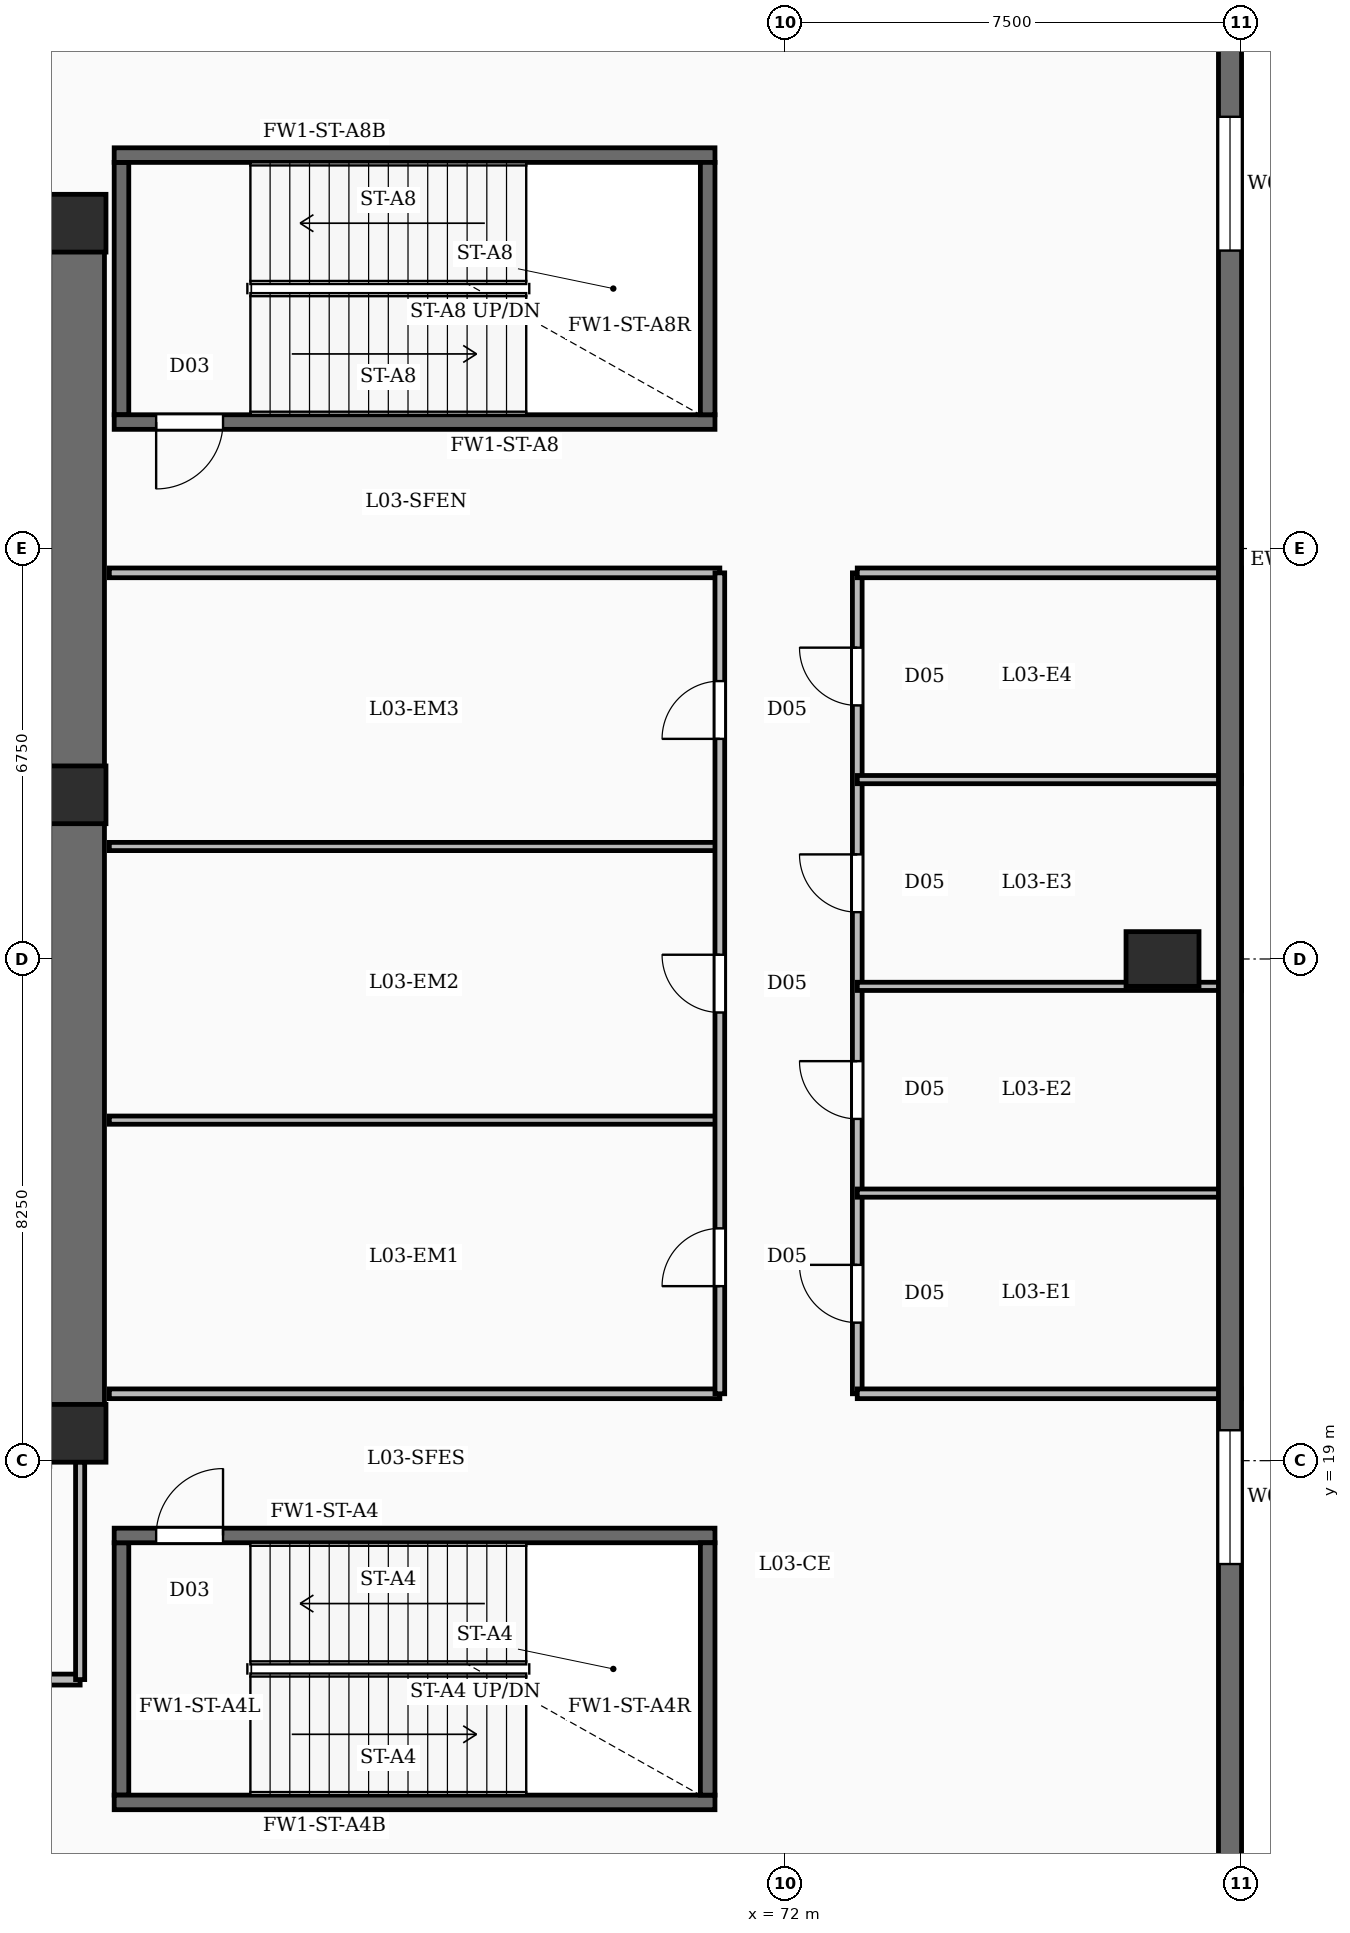
"""IFC4 building model, lengths in metres.
Left out: names, types, materials, properties, quantities, classifications, styles, units other than length and angle.
Written with IfcOpenShell. Run it as: python <this file> out.ifc"""

import sys

from ifc_helpers import new_model, si_unit, direction, frame, frame_2d, origin, origin_2d, place, context, subcontext, project, spatial, rectangle, extrude, element, fill, save


model = new_model("IFC4")
c1 = context("Model", 3, precision=1e-05, world=origin(), true_north=direction((0.0, 1.0)))
c2 = subcontext(c1, "Body", "Model", "MODEL_VIEW")
j1 = project(units=[si_unit("LENGTHUNIT", "METRE"), si_unit("PLANEANGLEUNIT", "RADIAN")], contexts=[c1])
p1 = place(None, origin())
s1 = spatial("IfcSite", under=j1, at=p1, CompositionType="ELEMENT")
p2 = place(p1, origin())
s2 = spatial("IfcBuilding", under=s1, at=p2, CompositionType="ELEMENT")
p3 = place(p2, frame((0.0, 0.0, 18.0)))
s3 = spatial("IfcBuildingStorey", under=s2, at=p3, CompositionType="ELEMENT", Elevation=18.0)
p4 = place(p3, frame((60.35, 19.0, -0.35), z_axis=(0.0, 0.0, 1.0), x_axis=(0.0, 1.0, 0.0)))
e1 = element("IfcWall", 1, at=p4, inside=s3, PredefinedType="SHEAR", context=c2, shape_type="SweptSolid", body=[
    extrude(rectangle(XDim=20.8, YDim=0.9, at=frame_2d((10.4, 0.0))), origin(), (0.0, 0.0, 1.0), 5.0),
])
for number, where, z_axis, x_axis in (
    (2, (60.35, 19.45, -0.35), (0.0, 0.0, 1.0), (1.0, 0.0, 0.0)),
    (3, (60.35, 29.95, -0.35), (0.0, 0.0, 1.0), (1.0, 0.0, 0.0)),
    (4, (60.35, 39.35, -0.35), (0.0, 0.0, 1.0), (1.0, 0.0, 0.0)),
):
    element("IfcColumn", number, at=place(p3, frame(where, z_axis=z_axis, x_axis=x_axis)), inside=s3, PredefinedType="COLUMN", context=c2, shape_type="SweptSolid", body=[
        extrude(rectangle(XDim=0.95, YDim=0.95, at=origin_2d()), origin(), (0.0, 0.0, 1.0), 5.0),
    ])
p5 = place(p3, frame((78.2, 27.25, -0.35), z_axis=(0.0, 0.0, 1.0), x_axis=(1.0, 0.0, 0.0)))
e5 = element("IfcColumn", 5, at=p5, inside=s3, PredefinedType="COLUMN", context=c2, shape_type="SweptSolid", body=[
    extrude(rectangle(XDim=1.2, YDim=0.9, at=origin_2d()), origin(), (0.0, 0.0, 1.0), 5.0),
])
p6 = place(p3, frame((79.31, 49.1, 0.0), z_axis=(0.0, 0.0, 1.0), x_axis=(0.0, -1.0, 0.0)))
e6 = element("IfcWall", 6, at=p6, inside=s3, PredefinedType="SOLIDWALL", context=c2, shape_type="SweptSolid", body=[
    extrude(rectangle(XDim=43.7, YDim=0.38, at=frame_2d((21.85, 0.0))), origin(), (0.0, 0.0, 1.0), 4.65),
])
p7 = place(p6, frame((2.6, 0.0, 0.95)))
e7 = element("IfcOpeningElement", 7, at=p7, cuts=e6, PredefinedType="OPENING", context=c2, shape_type="SweptSolid", body=[
    extrude(rectangle(XDim=2.2, YDim=2.5, at=frame_2d((1.1, 1.25))), frame((0.0, 0.2, 0.0), z_axis=(0.0, -1.0, 0.0), x_axis=(1.0, 0.0, 0.0)), (0.0, 0.0, 1.0), 0.4),
])
p8 = place(p6, frame((8.0, 0.0, 0.95)))
e8 = element("IfcOpeningElement", 8, at=p8, cuts=e6, PredefinedType="OPENING", context=c2, shape_type="SweptSolid", body=[
    extrude(rectangle(XDim=2.2, YDim=2.5, at=frame_2d((1.1, 1.25))), frame((0.0, 0.2, 0.0), z_axis=(0.0, -1.0, 0.0), x_axis=(1.0, 0.0, 0.0)), (0.0, 0.0, 1.0), 0.4),
])
p9 = place(p6, frame((29.6, 0.0, 0.95)))
e9 = element("IfcOpeningElement", 9, at=p9, cuts=e6, PredefinedType="OPENING", context=c2, shape_type="SweptSolid", body=[
    extrude(rectangle(XDim=2.2, YDim=2.5, at=frame_2d((1.1, 1.25))), frame((0.0, 0.2, 0.0), z_axis=(0.0, -1.0, 0.0), x_axis=(1.0, 0.0, 0.0)), (0.0, 0.0, 1.0), 0.4),
])
p10 = place(p3, frame((60.96, 17.77, 0.0), z_axis=(0.0, 0.0, 1.0), x_axis=(1.0, 0.0, 0.0)))
e10 = element("IfcWall", 10, at=p10, inside=s3, PredefinedType="SOLIDWALL", context=c2, shape_type="SweptSolid", body=[
    extrude(rectangle(XDim=9.88, YDim=0.24, at=frame_2d((4.94, 0.0))), origin(), (0.0, 0.0, 1.0), 4.65),
])
p11 = place(p10, frame((0.69, 0.0, 0.0)))
e11 = element("IfcOpeningElement", 11, at=p11, cuts=e10, PredefinedType="OPENING", context=c2, shape_type="SweptSolid", body=[
    extrude(rectangle(XDim=1.1, YDim=2.15, at=frame_2d((0.55, 1.075))), frame((0.0, 0.13, 0.0), z_axis=(0.0, -1.0, 0.0), x_axis=(1.0, 0.0, 0.0)), (0.0, 0.0, 1.0), 0.26),
])
p12 = place(p3, frame((60.96, 13.38, 0.0), z_axis=(0.0, 0.0, 1.0), x_axis=(1.0, 0.0, 0.0)))
e12 = element("IfcWall", 12, at=p12, inside=s3, PredefinedType="SOLIDWALL", context=c2, shape_type="SweptSolid", body=[
    extrude(rectangle(XDim=9.88, YDim=0.24, at=frame_2d((4.94, 0.0))), origin(), (0.0, 0.0, 1.0), 4.65),
])
for number, where, z_axis, x_axis in (
    (13, (61.08, 13.5, 0.0), (0.0, 0.0, 1.0), (0.0, 1.0, 0.0)),
    (14, (70.72, 13.5, 0.0), (0.0, 0.0, 1.0), (0.0, 1.0, 0.0)),
):
    element("IfcWall", number, at=place(p3, frame(where, z_axis=z_axis, x_axis=x_axis)), inside=s3, PredefinedType="SOLIDWALL", context=c2, shape_type="SweptSolid", body=[
        extrude(rectangle(XDim=4.15, YDim=0.24, at=frame_2d((2.075, 0.0))), origin(), (0.0, 0.0, 1.0), 4.65),
    ])
p13 = place(p3, frame((70.84, 36.08, 0.0), z_axis=(0.0, 0.0, 1.0), x_axis=(-1.0, 0.0, 0.0)))
e15 = element("IfcWall", 15, at=p13, inside=s3, PredefinedType="SOLIDWALL", context=c2, shape_type="SweptSolid", body=[
    extrude(rectangle(XDim=9.88, YDim=0.24, at=frame_2d((4.94, 0.0))), origin(), (0.0, 0.0, 1.0), 4.65),
])
p14 = place(p13, frame((8.09, 0.0, 0.0)))
e16 = element("IfcOpeningElement", 16, at=p14, cuts=e15, PredefinedType="OPENING", context=c2, shape_type="SweptSolid", body=[
    extrude(rectangle(XDim=1.1, YDim=2.15, at=frame_2d((0.55, 1.075))), frame((0.0, 0.13, 0.0), z_axis=(0.0, -1.0, 0.0), x_axis=(1.0, 0.0, 0.0)), (0.0, 0.0, 1.0), 0.26),
])
p15 = place(p3, frame((60.96, 40.47, 0.0), z_axis=(0.0, 0.0, 1.0), x_axis=(1.0, 0.0, 0.0)))
e17 = element("IfcWall", 17, at=p15, inside=s3, PredefinedType="SOLIDWALL", context=c2, shape_type="SweptSolid", body=[
    extrude(rectangle(XDim=9.88, YDim=0.24, at=frame_2d((4.94, 0.0))), origin(), (0.0, 0.0, 1.0), 4.65),
])
for number, where, z_axis, x_axis in (
    (18, (61.08, 36.2, 0.0), (0.0, 0.0, 1.0), (0.0, 1.0, 0.0)),
    (19, (70.72, 36.2, 0.0), (0.0, 0.0, 1.0), (0.0, 1.0, 0.0)),
):
    element("IfcWall", number, at=place(p3, frame(where, z_axis=z_axis, x_axis=x_axis)), inside=s3, PredefinedType="SOLIDWALL", context=c2, shape_type="SweptSolid", body=[
        extrude(rectangle(XDim=4.15, YDim=0.24, at=frame_2d((2.075, 0.0))), origin(), (0.0, 0.0, 1.0), 4.65),
    ])
p16 = place(p3, frame((50.4, 15.4, 0.0), z_axis=(0.0, 0.0, 1.0), x_axis=(1.0, 0.0, 0.0)))
e20 = element("IfcWall", 20, at=p16, inside=s3, PredefinedType="SOLIDWALL", context=c2, shape_type="SweptSolid", body=[
    extrude(rectangle(XDim=10.0, YDim=0.18, at=frame_2d((5.0, 0.0))), origin(), (0.0, 0.0, 1.0), 3.71),
])
p17 = place(p16, frame((0.54, 0.0, 0.0)))
e21 = element("IfcOpeningElement", 21, at=p17, cuts=e20, PredefinedType="OPENING", context=c2, shape_type="SweptSolid", body=[
    extrude(rectangle(XDim=0.92, YDim=2.1, at=frame_2d((0.46, 1.05))), frame((0.0, 0.1, 0.0), z_axis=(0.0, -1.0, 0.0), x_axis=(1.0, 0.0, 0.0)), (0.0, 0.0, 1.0), 0.2),
])
p18 = place(p16, frame((2.54, 0.0, 0.0)))
e22 = element("IfcOpeningElement", 22, at=p18, cuts=e20, PredefinedType="OPENING", context=c2, shape_type="SweptSolid", body=[
    extrude(rectangle(XDim=0.92, YDim=2.1, at=frame_2d((0.46, 1.05))), frame((0.0, 0.1, 0.0), z_axis=(0.0, -1.0, 0.0), x_axis=(1.0, 0.0, 0.0)), (0.0, 0.0, 1.0), 0.2),
])
p19 = place(p16, frame((4.54, 0.0, 0.0)))
e23 = element("IfcOpeningElement", 23, at=p19, cuts=e20, PredefinedType="OPENING", context=c2, shape_type="SweptSolid", body=[
    extrude(rectangle(XDim=0.92, YDim=2.1, at=frame_2d((0.46, 1.05))), frame((0.0, 0.1, 0.0), z_axis=(0.0, -1.0, 0.0), x_axis=(1.0, 0.0, 0.0)), (0.0, 0.0, 1.0), 0.2),
])
p20 = place(p16, frame((6.54, 0.0, 0.0)))
e24 = element("IfcOpeningElement", 24, at=p20, cuts=e20, PredefinedType="OPENING", context=c2, shape_type="SweptSolid", body=[
    extrude(rectangle(XDim=0.92, YDim=2.1, at=frame_2d((0.46, 1.05))), frame((0.0, 0.1, 0.0), z_axis=(0.0, -1.0, 0.0), x_axis=(1.0, 0.0, 0.0)), (0.0, 0.0, 1.0), 0.2),
])
p21 = place(p16, frame((8.57, 0.0, 0.0)))
e25 = element("IfcOpeningElement", 25, at=p21, cuts=e20, PredefinedType="OPENING", context=c2, shape_type="SweptSolid", body=[
    extrude(rectangle(XDim=0.86, YDim=2.05, at=frame_2d((0.43, 1.025))), frame((0.0, 0.1, 0.0), z_axis=(0.0, -1.0, 0.0), x_axis=(1.0, 0.0, 0.0)), (0.0, 0.0, 1.0), 0.2),
])
p22 = place(p3, frame((60.4, 15.4, 0.0), z_axis=(0.0, 0.0, 1.0), x_axis=(0.0, 1.0, 0.0)))
e26 = element("IfcWall", 26, at=p22, inside=s3, PredefinedType="PARTITIONING", context=c2, shape_type="SweptSolid", body=[
    extrude(rectangle(XDim=3.58, YDim=0.15, at=frame_2d((1.79, 0.0))), origin(), (0.0, 0.0, 1.0), 3.71),
])
for number, where, z_axis, x_axis in (
    (27, (73.18, 23.4, 0.0), (0.0, 0.0, 1.0), (1.0, 0.0, 0.0)),
    (28, (73.18, 26.8, 0.0), (0.0, 0.0, 1.0), (1.0, 0.0, 0.0)),
    (29, (73.18, 30.2, 0.0), (0.0, 0.0, 1.0), (1.0, 0.0, 0.0)),
):
    element("IfcWall", number, at=place(p3, frame(where, z_axis=z_axis, x_axis=x_axis)), inside=s3, PredefinedType="PARTITIONING", context=c2, shape_type="SweptSolid", body=[
        extrude(rectangle(XDim=6.32, YDim=0.135, at=frame_2d((3.16, 0.0))), origin(), (0.0, 0.0, 1.0), 3.71),
    ])
for number, where, z_axis, x_axis in (
    (30, (60.88, 24.6, 0.0), (0.0, 0.0, 1.0), (1.0, 0.0, 0.0)),
    (31, (60.88, 29.1, 0.0), (0.0, 0.0, 1.0), (1.0, 0.0, 0.0)),
):
    element("IfcWall", number, at=place(p3, frame(where, z_axis=z_axis, x_axis=x_axis)), inside=s3, PredefinedType="PARTITIONING", context=c2, shape_type="SweptSolid", body=[
        extrude(rectangle(XDim=10.04, YDim=0.135, at=frame_2d((5.02, 0.0))), origin(), (0.0, 0.0, 1.0), 3.71),
    ])
p23 = place(p3, frame((70.92, 20.1, 0.0), z_axis=(0.0, 0.0, 1.0), x_axis=(0.0, 1.0, 0.0)))
e32 = element("IfcWall", 32, at=p23, inside=s3, PredefinedType="PARTITIONING", context=c2, shape_type="SweptSolid", body=[
    extrude(rectangle(XDim=13.5, YDim=0.16, at=frame_2d((6.75, 0.0))), origin(), (0.0, 0.0, 1.0), 3.71),
])
p24 = place(p23, frame((1.77, 0.0, 0.0)))
e33 = element("IfcOpeningElement", 33, at=p24, cuts=e32, PredefinedType="OPENING", context=c2, shape_type="SweptSolid", body=[
    extrude(rectangle(XDim=0.95, YDim=2.15, at=frame_2d((0.475, 1.075))), frame((0.0, 0.09, 0.0), z_axis=(0.0, -1.0, 0.0), x_axis=(1.0, 0.0, 0.0)), (0.0, 0.0, 1.0), 0.18),
])
p25 = place(p23, frame((6.27, 0.0, 0.0)))
e34 = element("IfcOpeningElement", 34, at=p25, cuts=e32, PredefinedType="OPENING", context=c2, shape_type="SweptSolid", body=[
    extrude(rectangle(XDim=0.95, YDim=2.15, at=frame_2d((0.475, 1.075))), frame((0.0, 0.09, 0.0), z_axis=(0.0, -1.0, 0.0), x_axis=(1.0, 0.0, 0.0)), (0.0, 0.0, 1.0), 0.18),
])
p26 = place(p23, frame((10.77, 0.0, 0.0)))
e35 = element("IfcOpeningElement", 35, at=p26, cuts=e32, PredefinedType="OPENING", context=c2, shape_type="SweptSolid", body=[
    extrude(rectangle(XDim=0.95, YDim=2.15, at=frame_2d((0.475, 1.075))), frame((0.0, 0.09, 0.0), z_axis=(0.0, -1.0, 0.0), x_axis=(1.0, 0.0, 0.0)), (0.0, 0.0, 1.0), 0.18),
])
p27 = place(p3, frame((73.18, 20.1, 0.0), z_axis=(0.0, 0.0, 1.0), x_axis=(0.0, 1.0, 0.0)))
e36 = element("IfcWall", 36, at=p27, inside=s3, PredefinedType="PARTITIONING", context=c2, shape_type="SweptSolid", body=[
    extrude(rectangle(XDim=13.5, YDim=0.16, at=frame_2d((6.75, 0.0))), origin(), (0.0, 0.0, 1.0), 3.71),
])
p28 = place(p27, frame((1.17, 0.0, 0.0)))
e37 = element("IfcOpeningElement", 37, at=p28, cuts=e36, PredefinedType="OPENING", context=c2, shape_type="SweptSolid", body=[
    extrude(rectangle(XDim=0.95, YDim=2.15, at=frame_2d((0.475, 1.075))), frame((0.0, 0.09, 0.0), z_axis=(0.0, -1.0, 0.0), x_axis=(1.0, 0.0, 0.0)), (0.0, 0.0, 1.0), 0.18),
])
p29 = place(p27, frame((4.52, 0.0, 0.0)))
e38 = element("IfcOpeningElement", 38, at=p29, cuts=e36, PredefinedType="OPENING", context=c2, shape_type="SweptSolid", body=[
    extrude(rectangle(XDim=0.95, YDim=2.15, at=frame_2d((0.475, 1.075))), frame((0.0, 0.09, 0.0), z_axis=(0.0, -1.0, 0.0), x_axis=(1.0, 0.0, 0.0)), (0.0, 0.0, 1.0), 0.18),
])
p30 = place(p27, frame((7.92, 0.0, 0.0)))
e39 = element("IfcOpeningElement", 39, at=p30, cuts=e36, PredefinedType="OPENING", context=c2, shape_type="SweptSolid", body=[
    extrude(rectangle(XDim=0.95, YDim=2.15, at=frame_2d((0.475, 1.075))), frame((0.0, 0.09, 0.0), z_axis=(0.0, -1.0, 0.0), x_axis=(1.0, 0.0, 0.0)), (0.0, 0.0, 1.0), 0.18),
])
p31 = place(p27, frame((11.32, 0.0, 0.0)))
e40 = element("IfcOpeningElement", 40, at=p31, cuts=e36, PredefinedType="OPENING", context=c2, shape_type="SweptSolid", body=[
    extrude(rectangle(XDim=0.95, YDim=2.15, at=frame_2d((0.475, 1.075))), frame((0.0, 0.09, 0.0), z_axis=(0.0, -1.0, 0.0), x_axis=(1.0, 0.0, 0.0)), (0.0, 0.0, 1.0), 0.18),
])
for number, where, z_axis, x_axis in (
    (41, (60.88, 20.1, 0.0), (0.0, 0.0, 1.0), (1.0, 0.0, 0.0)),
    (42, (60.88, 33.6, 0.0), (0.0, 0.0, 1.0), (1.0, 0.0, 0.0)),
):
    element("IfcWall", number, at=place(p3, frame(where, z_axis=z_axis, x_axis=x_axis)), inside=s3, PredefinedType="PARTITIONING", context=c2, shape_type="SweptSolid", body=[
        extrude(rectangle(XDim=10.04, YDim=0.16, at=frame_2d((5.02, 0.0))), origin(), (0.0, 0.0, 1.0), 3.71),
    ])
for number, where, z_axis, x_axis in (
    (43, (73.18, 20.1, 0.0), (0.0, 0.0, 1.0), (1.0, 0.0, 0.0)),
    (44, (73.18, 33.6, 0.0), (0.0, 0.0, 1.0), (1.0, 0.0, 0.0)),
):
    element("IfcWall", number, at=place(p3, frame(where, z_axis=z_axis, x_axis=x_axis)), inside=s3, PredefinedType="PARTITIONING", context=c2, shape_type="SweptSolid", body=[
        extrude(rectangle(XDim=6.32, YDim=0.16, at=frame_2d((3.16, 0.0))), origin(), (0.0, 0.0, 1.0), 3.71),
    ])
p32 = place(p8, origin())
e45 = element("IfcWindow", 45, at=p32, inside=s3, PartitioningType="DOUBLE_PANEL_VERTICAL", PredefinedType="WINDOW", context=c2, shape_type="SweptSolid", body=[
    extrude(rectangle(XDim=2.2, YDim=2.5, at=frame_2d((1.1, 1.25))), frame((0.0, 0.03, 0.0), z_axis=(0.0, -1.0, 0.0), x_axis=(1.0, 0.0, 0.0)), (0.0, 0.0, 1.0), 0.06),
])
fill(e8, e45)
p33 = place(p9, origin())
e46 = element("IfcWindow", 46, at=p33, inside=s3, PartitioningType="DOUBLE_PANEL_VERTICAL", PredefinedType="WINDOW", context=c2, shape_type="SweptSolid", body=[
    extrude(rectangle(XDim=2.2, YDim=2.5, at=frame_2d((1.1, 1.25))), frame((0.0, 0.03, 0.0), z_axis=(0.0, -1.0, 0.0), x_axis=(1.0, 0.0, 0.0)), (0.0, 0.0, 1.0), 0.06),
])
fill(e9, e46)
p34 = place(p11, origin())
e47 = element("IfcDoor", 47, at=p34, inside=s3, OperationType="SINGLE_SWING_RIGHT", PredefinedType="DOOR", context=c2, shape_type="SweptSolid", body=[
    extrude(rectangle(XDim=1.1, YDim=2.15, at=frame_2d((0.55, 1.075))), frame((0.0, 0.025, 0.0), z_axis=(0.0, -1.0, 0.0), x_axis=(1.0, 0.0, 0.0)), (0.0, 0.0, 1.0), 0.05),
])
fill(e11, e47)
p35 = place(p14, origin())
e48 = element("IfcDoor", 48, at=p35, inside=s3, OperationType="SINGLE_SWING_RIGHT", PredefinedType="DOOR", context=c2, shape_type="SweptSolid", body=[
    extrude(rectangle(XDim=1.1, YDim=2.15, at=frame_2d((0.55, 1.075))), frame((0.0, 0.025, 0.0), z_axis=(0.0, -1.0, 0.0), x_axis=(1.0, 0.0, 0.0)), (0.0, 0.0, 1.0), 0.05),
])
fill(e16, e48)
p36 = place(p24, origin())
e49 = element("IfcDoor", 49, at=p36, inside=s3, OperationType="SINGLE_SWING_LEFT", PredefinedType="DOOR", context=c2, shape_type="SweptSolid", body=[
    extrude(rectangle(XDim=0.95, YDim=2.15, at=frame_2d((0.475, 1.075))), frame((0.0, 0.025, 0.0), z_axis=(0.0, -1.0, 0.0), x_axis=(1.0, 0.0, 0.0)), (0.0, 0.0, 1.0), 0.05),
])
fill(e33, e49)
p37 = place(p25, origin())
e50 = element("IfcDoor", 50, at=p37, inside=s3, OperationType="SINGLE_SWING_RIGHT", PredefinedType="DOOR", context=c2, shape_type="SweptSolid", body=[
    extrude(rectangle(XDim=0.95, YDim=2.15, at=frame_2d((0.475, 1.075))), frame((0.0, 0.025, 0.0), z_axis=(0.0, -1.0, 0.0), x_axis=(1.0, 0.0, 0.0)), (0.0, 0.0, 1.0), 0.05),
])
fill(e34, e50)
p38 = place(p26, origin())
e51 = element("IfcDoor", 51, at=p38, inside=s3, OperationType="SINGLE_SWING_LEFT", PredefinedType="DOOR", context=c2, shape_type="SweptSolid", body=[
    extrude(rectangle(XDim=0.95, YDim=2.15, at=frame_2d((0.475, 1.075))), frame((0.0, 0.025, 0.0), z_axis=(0.0, -1.0, 0.0), x_axis=(1.0, 0.0, 0.0)), (0.0, 0.0, 1.0), 0.05),
])
fill(e35, e51)
p39 = place(p28, origin())
e52 = element("IfcDoor", 52, at=p39, inside=s3, OperationType="SINGLE_SWING_RIGHT", PredefinedType="DOOR", context=c2, shape_type="SweptSolid", body=[
    extrude(rectangle(XDim=0.95, YDim=2.15, at=frame_2d((0.475, 1.075))), frame((0.0, 0.025, 0.0), z_axis=(0.0, -1.0, 0.0), x_axis=(1.0, 0.0, 0.0)), (0.0, 0.0, 1.0), 0.05),
])
fill(e37, e52)
p40 = place(p29, origin())
e53 = element("IfcDoor", 53, at=p40, inside=s3, OperationType="SINGLE_SWING_RIGHT", PredefinedType="DOOR", context=c2, shape_type="SweptSolid", body=[
    extrude(rectangle(XDim=0.95, YDim=2.15, at=frame_2d((0.475, 1.075))), frame((0.0, 0.025, 0.0), z_axis=(0.0, -1.0, 0.0), x_axis=(1.0, 0.0, 0.0)), (0.0, 0.0, 1.0), 0.05),
])
fill(e38, e53)
p41 = place(p30, origin())
e54 = element("IfcDoor", 54, at=p41, inside=s3, OperationType="SINGLE_SWING_RIGHT", PredefinedType="DOOR", context=c2, shape_type="SweptSolid", body=[
    extrude(rectangle(XDim=0.95, YDim=2.15, at=frame_2d((0.475, 1.075))), frame((0.0, 0.025, 0.0), z_axis=(0.0, -1.0, 0.0), x_axis=(1.0, 0.0, 0.0)), (0.0, 0.0, 1.0), 0.05),
])
fill(e39, e54)
p42 = place(p31, origin())
e55 = element("IfcDoor", 55, at=p42, inside=s3, OperationType="SINGLE_SWING_RIGHT", PredefinedType="DOOR", context=c2, shape_type="SweptSolid", body=[
    extrude(rectangle(XDim=0.95, YDim=2.15, at=frame_2d((0.475, 1.075))), frame((0.0, 0.025, 0.0), z_axis=(0.0, -1.0, 0.0), x_axis=(1.0, 0.0, 0.0)), (0.0, 0.0, 1.0), 0.05),
])
fill(e40, e55)
save(model, sys.argv[1])
